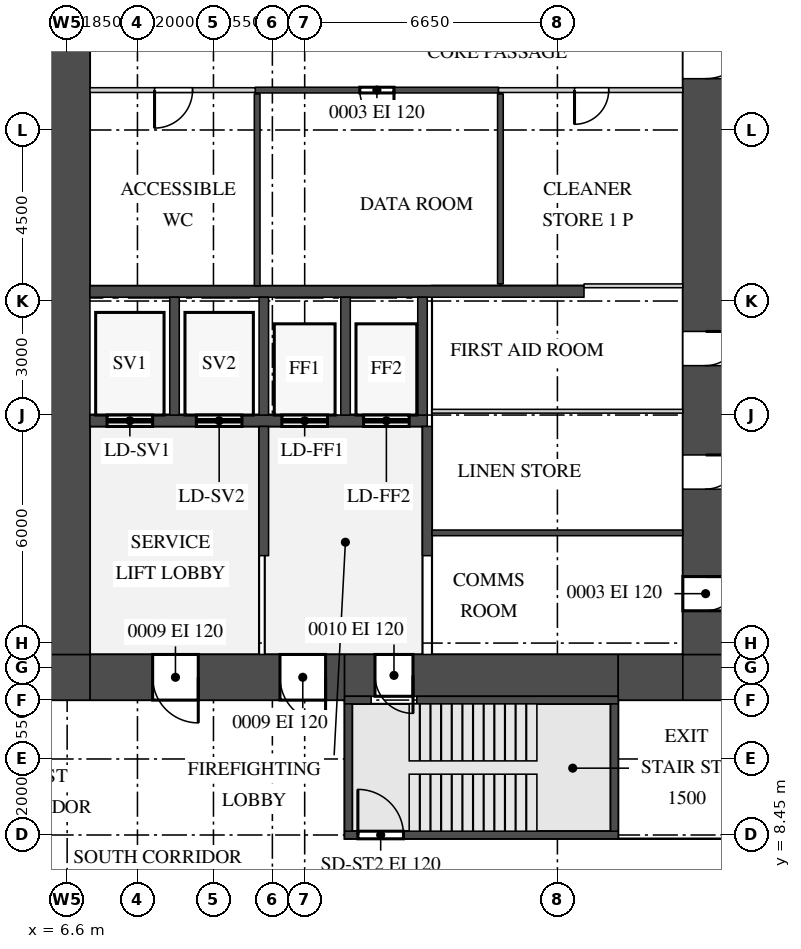
"""IFC4 building model, lengths in metres.
Left out: names, types, materials, properties, quantities, classifications, styles, units other than length and angle.
Written with IfcOpenShell. Run it as: python <this file> out.ifc"""

import sys

from ifc_helpers import new_model, si_unit, direction, frame, frame_2d, origin, place, context, subcontext, project, spatial, rectangle, extrude, source, transform, mapped, element, fill, save


model = new_model("IFC4")
c1 = context("Model", 3, precision=1e-05, world=origin(), true_north=direction((0.0, 1.0)))
c2 = subcontext(c1, "Body", "Model", "MODEL_VIEW")
j1 = project(units=[si_unit("LENGTHUNIT", "METRE"), si_unit("PLANEANGLEUNIT", "RADIAN")], contexts=[c1])
p1 = place(None, origin())
s1 = spatial("IfcSite", under=j1, at=p1, CompositionType="ELEMENT")
p2 = place(p1, origin())
s2 = spatial("IfcBuilding", under=s1, at=p2, CompositionType="ELEMENT")
p3 = place(p2, frame((0.0, 0.0, 46.5)))
s3 = spatial("IfcBuildingStorey", under=s2, at=p3, CompositionType="ELEMENT", Elevation=46.5)
m1 = source(origin(), c2, "Body", "SweptSolid", [
    extrude(rectangle(XDim=6.7, YDim=1.2, at=frame_2d((3.35, 0.0))), origin(), (0.0, 0.0, 1.0), 4.2),
])
p4 = place(p3, frame((7.2, 12.6, 0.0), z_axis=(0.0, 0.0, 1.0), x_axis=(1.0, 0.0, 0.0)))
e1 = element("IfcWall", 1, at=p4, inside=s3, PredefinedType="SHEAR", context=c2, shape_type="MappedRepresentation", body=[
    mapped(m1, transform((0.0, 0.0, 0.0))),
])
m2 = source(origin(), c2, "Body", "SweptSolid", [
    extrude(rectangle(XDim=1.2, YDim=2.1, at=frame_2d((0.6, 1.05))), frame((0.0, 0.61, 0.0), z_axis=(0.0, -1.0, 0.0), x_axis=(1.0, 0.0, 0.0)), (0.0, 0.0, 1.0), 1.22),
])
p5 = place(p4, frame((5.0, 0.0, 0.0)))
e2 = element("IfcOpeningElement", 2, at=p5, cuts=e1, PredefinedType="OPENING", context=c2, shape_type="MappedRepresentation", body=[
    mapped(m2, transform((0.0, 0.0, 0.0))),
])
p6 = place(p4, frame((1.65, 0.0, 0.0)))
e3 = element("IfcOpeningElement", 3, at=p6, cuts=e1, PredefinedType="OPENING", context=c2, shape_type="MappedRepresentation", body=[
    mapped(m2, transform((0.0, 0.0, 0.0))),
])
m3 = source(origin(), c2, "Body", "SweptSolid", [
    extrude(rectangle(XDim=7.2, YDim=1.1, at=frame_2d((3.6, 0.0))), origin(), (0.0, 0.0, 1.0), 4.2),
])
p7 = place(p3, frame((13.9, 12.65, 0.0), z_axis=(0.0, 0.0, 1.0), x_axis=(1.0, 0.0, 0.0)))
e4 = element("IfcWall", 4, at=p7, inside=s3, PredefinedType="SHEAR", context=c2, shape_type="MappedRepresentation", body=[
    mapped(m3, transform((0.0, 0.0, 0.0))),
])
m4 = source(origin(), c2, "Body", "SweptSolid", [
    extrude(rectangle(XDim=1.0, YDim=2.1, at=frame_2d((0.5, 1.05))), frame((0.0, 0.56, 0.0), z_axis=(0.0, -1.0, 0.0), x_axis=(1.0, 0.0, 0.0)), (0.0, 0.0, 1.0), 1.12),
])
p8 = place(p7, frame((0.8, 0.0, 0.0)))
e5 = element("IfcOpeningElement", 5, at=p8, cuts=e4, PredefinedType="OPENING", context=c2, shape_type="MappedRepresentation", body=[
    mapped(m4, transform((0.0, 0.0, 0.0))),
])
m5 = source(origin(), c2, "Body", "SweptSolid", [
    extrude(rectangle(XDim=1.7, YDim=1.2, at=frame_2d((0.85, 0.0))), origin(), (0.0, 0.0, 1.0), 4.2),
])
p9 = place(p3, frame((21.1, 12.6, 0.0), z_axis=(0.0, 0.0, 1.0), x_axis=(1.0, 0.0, 0.0)))
e6 = element("IfcWall", 6, at=p9, inside=s3, PredefinedType="SHEAR", context=c2, shape_type="MappedRepresentation", body=[
    mapped(m5, transform((0.0, 0.0, 0.0))),
])
m6 = source(origin(), c2, "Body", "SweptSolid", [
    extrude(rectangle(XDim=1.2, YDim=1.2, at=frame_2d((0.6, 0.0))), origin(), (0.0, 0.0, 1.0), 4.2),
])
for number, where, z_axis, x_axis in (
    (7, (22.8, 12.6, 0.0), (0.0, 0.0, 1.0), (1.0, 0.0, 0.0)),
    (8, (6.0, 12.6, 0.0), (0.0, 0.0, 1.0), (1.0, 0.0, 0.0)),
):
    element("IfcWall", number, at=place(p3, frame(where, z_axis=z_axis, x_axis=x_axis)), inside=s3, PredefinedType="SHEAR", context=c2, shape_type="MappedRepresentation", body=[
        mapped(m6, transform((0.0, 0.0, 0.0))),
    ])
m7 = source(origin(), c2, "Body", "SweptSolid", [
    extrude(rectangle(XDim=27.6, YDim=1.2, at=frame_2d((13.8, 0.0))), origin(), (0.0, 0.0, 1.0), 4.2),
])
p10 = place(p3, frame((23.4, 13.2, 0.0), z_axis=(0.0, 0.0, 1.0), x_axis=(0.0, 1.0, 0.0)))
e9 = element("IfcWall", 9, at=p10, inside=s3, PredefinedType="SHEAR", context=c2, shape_type="MappedRepresentation", body=[
    mapped(m7, transform((0.0, 0.0, 0.0))),
])
m8 = source(origin(), c2, "Body", "SweptSolid", [
    extrude(rectangle(XDim=1.8, YDim=2.1, at=frame_2d((0.9, 1.05))), frame((0.0, 0.61, 0.0), z_axis=(0.0, -1.0, 0.0), x_axis=(1.0, 0.0, 0.0)), (0.0, 0.0, 1.0), 1.22),
])
p11 = place(p10, frame((22.4, 0.0, 0.0)))
e10 = element("IfcOpeningElement", 10, at=p11, cuts=e9, PredefinedType="OPENING", context=c2, shape_type="MappedRepresentation", body=[
    mapped(m8, transform((0.0, 0.0, 0.0))),
])
p12 = place(p10, frame((15.15, 0.0, 0.0)))
e11 = element("IfcOpeningElement", 11, at=p12, cuts=e9, PredefinedType="OPENING", context=c2, shape_type="MappedRepresentation", body=[
    mapped(m2, transform((0.0, 0.0, 0.0))),
])
m9 = source(origin(), c2, "Body", "SweptSolid", [
    extrude(rectangle(XDim=0.9, YDim=2.1, at=frame_2d((0.45, 1.05))), frame((0.0, 0.61, 0.0), z_axis=(0.0, -1.0, 0.0), x_axis=(1.0, 0.0, 0.0)), (0.0, 0.0, 1.0), 1.22),
])
p13 = place(p10, frame((1.15, 0.0, 0.0)))
e12 = element("IfcOpeningElement", 12, at=p13, cuts=e9, PredefinedType="OPENING", context=c2, shape_type="MappedRepresentation", body=[
    mapped(m9, transform((0.0, 0.0, 0.0))),
])
p14 = place(p10, frame((4.35, 0.0, 0.0)))
e13 = element("IfcOpeningElement", 13, at=p14, cuts=e9, PredefinedType="OPENING", context=c2, shape_type="MappedRepresentation", body=[
    mapped(m9, transform((0.0, 0.0, 0.0))),
])
p15 = place(p10, frame((7.6, 0.0, 0.0)))
e14 = element("IfcOpeningElement", 14, at=p15, cuts=e9, PredefinedType="OPENING", context=c2, shape_type="MappedRepresentation", body=[
    mapped(m9, transform((0.0, 0.0, 0.0))),
])
p16 = place(p3, frame((6.6, 13.2, 0.0), z_axis=(0.0, 0.0, 1.0), x_axis=(0.0, 1.0, 0.0)))
e15 = element("IfcWall", 15, at=p16, inside=s3, PredefinedType="SHEAR", context=c2, shape_type="MappedRepresentation", body=[
    mapped(m7, transform((0.0, 0.0, 0.0))),
])
m10 = source(origin(), c2, "Body", "SweptSolid", [
    extrude(rectangle(XDim=0.7, YDim=0.2, at=frame_2d((0.35, 0.0))), origin(), (0.0, 0.0, 1.0), 4.2),
])
p17 = place(p3, frame((13.9, 12.0, 0.0), z_axis=(0.0, 0.0, 1.0), x_axis=(1.0, 0.0, 0.0)))
e16 = element("IfcWall", 16, at=p17, inside=s3, PredefinedType="SHEAR", context=c2, shape_type="MappedRepresentation", body=[
    mapped(m10, transform((0.0, 0.0, 0.0))),
])
m11 = source(origin(), c2, "Body", "SweptSolid", [
    extrude(rectangle(XDim=5.3, YDim=0.2, at=frame_2d((2.65, 0.0))), origin(), (0.0, 0.0, 1.0), 4.2),
])
p18 = place(p3, frame((15.8, 12.0, 0.0), z_axis=(0.0, 0.0, 1.0), x_axis=(1.0, 0.0, 0.0)))
e17 = element("IfcWall", 17, at=p18, inside=s3, PredefinedType="SHEAR", context=c2, shape_type="MappedRepresentation", body=[
    mapped(m11, transform((0.0, 0.0, 0.0))),
])
m12 = source(origin(), c2, "Body", "SweptSolid", [
    extrude(rectangle(XDim=7.2, YDim=0.2, at=frame_2d((3.6, 0.0))), origin(), (0.0, 0.0, 1.0), 4.2),
])
p19 = place(p3, frame((13.9, 8.45, 0.0), z_axis=(0.0, 0.0, 1.0), x_axis=(1.0, 0.0, 0.0)))
e18 = element("IfcWall", 18, at=p19, inside=s3, PredefinedType="SHEAR", context=c2, shape_type="MappedRepresentation", body=[
    mapped(m12, transform((0.0, 0.0, 0.0))),
])
m13 = source(origin(), c2, "Body", "SweptSolid", [
    extrude(rectangle(XDim=1.2, YDim=2.1, at=frame_2d((0.6, 1.05))), frame((0.0, 0.11, 0.0), z_axis=(0.0, -1.0, 0.0), x_axis=(1.0, 0.0, 0.0)), (0.0, 0.0, 1.0), 0.22),
])
p20 = place(p19, frame((0.35, 0.0, 0.0)))
e19 = element("IfcOpeningElement", 19, at=p20, cuts=e18, PredefinedType="OPENING", context=c2, shape_type="MappedRepresentation", body=[
    mapped(m13, transform((0.0, 0.0, 0.0))),
])
m14 = source(origin(), c2, "Body", "SweptSolid", [
    extrude(rectangle(XDim=3.35, YDim=0.2, at=frame_2d((1.675, 0.0))), origin(), (0.0, 0.0, 1.0), 4.2),
])
for number, where, z_axis, x_axis in (
    (20, (21.0, 8.55, 0.0), (0.0, 0.0, 1.0), (0.0, 1.0, 0.0)),
    (21, (14.0, 8.55, 0.0), (0.0, 0.0, 1.0), (0.0, 1.0, 0.0)),
):
    element("IfcWall", number, at=place(p3, frame(where, z_axis=z_axis, x_axis=x_axis)), inside=s3, PredefinedType="SHEAR", context=c2, shape_type="MappedRepresentation", body=[
        mapped(m14, transform((0.0, 0.0, 0.0))),
    ])
m15 = source(origin(), c2, "Body", "SweptSolid", [
    extrude(rectangle(XDim=13.0, YDim=0.3, at=frame_2d((6.5, 0.0))), origin(), (0.0, 0.0, 1.0), 4.2),
])
p21 = place(p3, frame((7.2, 22.75, 0.0), z_axis=(0.0, 0.0, 1.0), x_axis=(1.0, 0.0, 0.0)))
e22 = element("IfcWall", 22, at=p21, inside=s3, PredefinedType="STANDARD", context=c2, shape_type="MappedRepresentation", body=[
    mapped(m15, transform((0.0, 0.0, 0.0))),
])
m16 = source(origin(), c2, "Body", "SweptSolid", [
    extrude(rectangle(XDim=8.875, YDim=0.3, at=frame_2d((4.438, 0.0))), origin(), (0.0, 0.0, 1.0), 4.2),
])
p22 = place(p3, frame((7.2, 19.35, 0.0), z_axis=(0.0, 0.0, 1.0), x_axis=(1.0, 0.0, 0.0)))
e23 = element("IfcWall", 23, at=p22, inside=s3, PredefinedType="STANDARD", context=c2, shape_type="MappedRepresentation", body=[
    mapped(m16, transform((0.0, 0.0, 0.0))),
])
m17 = source(origin(), c2, "Body", "SweptSolid", [
    extrude(rectangle(XDim=1.2, YDim=2.1, at=frame_2d((0.6, 1.05))), frame((0.0, 0.16, 0.0), z_axis=(0.0, -1.0, 0.0), x_axis=(1.0, 0.0, 0.0)), (0.0, 0.0, 1.0), 0.32),
])
p23 = place(p22, frame((0.45, 0.0, 0.0)))
e24 = element("IfcOpeningElement", 24, at=p23, cuts=e23, PredefinedType="OPENING", context=c2, shape_type="MappedRepresentation", body=[
    mapped(m17, transform((0.0, 0.0, 0.0))),
])
p24 = place(p22, frame((2.8, 0.0, 0.0)))
e25 = element("IfcOpeningElement", 25, at=p24, cuts=e23, PredefinedType="OPENING", context=c2, shape_type="MappedRepresentation", body=[
    mapped(m17, transform((0.0, 0.0, 0.0))),
])
p25 = place(p22, frame((5.05, 0.0, 0.0)))
e26 = element("IfcOpeningElement", 26, at=p25, cuts=e23, PredefinedType="OPENING", context=c2, shape_type="MappedRepresentation", body=[
    mapped(m17, transform((0.0, 0.0, 0.0))),
])
p26 = place(p22, frame((7.2, 0.0, 0.0)))
e27 = element("IfcOpeningElement", 27, at=p26, cuts=e23, PredefinedType="OPENING", context=c2, shape_type="MappedRepresentation", body=[
    mapped(m17, transform((0.0, 0.0, 0.0))),
])
m18 = source(origin(), c2, "Body", "SweptSolid", [
    extrude(rectangle(XDim=3.1, YDim=0.25, at=frame_2d((1.55, 0.0))), origin(), (0.0, 0.0, 1.0), 4.2),
])
for number, where, z_axis, x_axis in (
    (28, (9.425, 19.5, 0.0), (0.0, 0.0, 1.0), (0.0, 1.0, 0.0)),
    (29, (11.775, 19.5, 0.0), (0.0, 0.0, 1.0), (0.0, 1.0, 0.0)),
    (30, (13.925, 19.5, 0.0), (0.0, 0.0, 1.0), (0.0, 1.0, 0.0)),
    (31, (15.95, 19.5, 0.0), (0.0, 0.0, 1.0), (0.0, 1.0, 0.0)),
):
    element("IfcWall", number, at=place(p3, frame(where, z_axis=z_axis, x_axis=x_axis)), inside=s3, PredefinedType="STANDARD", context=c2, shape_type="MappedRepresentation", body=[
        mapped(m18, transform((0.0, 0.0, 0.0))),
    ])
m19 = source(origin(), c2, "Body", "SweptSolid", [
    extrude(rectangle(XDim=3.4, YDim=0.25, at=frame_2d((1.7, 0.0))), origin(), (0.0, 0.0, 1.0), 4.2),
])
for number, where, z_axis, x_axis in (
    (32, (16.075, 15.8, 0.0), (0.0, 0.0, 1.0), (0.0, 1.0, 0.0)),
    (33, (11.775, 15.8, 0.0), (0.0, 0.0, 1.0), (0.0, 1.0, 0.0)),
):
    element("IfcWall", number, at=place(p3, frame(where, z_axis=z_axis, x_axis=x_axis)), inside=s3, PredefinedType="STANDARD", context=c2, shape_type="MappedRepresentation", body=[
        mapped(m19, transform((0.0, 0.0, 0.0))),
    ])
m20 = source(origin(), c2, "Body", "SweptSolid", [
    extrude(rectangle(XDim=6.6, YDim=0.15, at=frame_2d((3.3, 0.0))), origin(), (0.0, 0.0, 1.0), 4.3),
])
p27 = place(p3, frame((16.2, 16.4, 0.0), z_axis=(0.0, 0.0, 1.0), x_axis=(1.0, 0.0, 0.0)))
e34 = element("IfcWall", 34, at=p27, inside=s3, PredefinedType="PARTITIONING", context=c2, shape_type="MappedRepresentation", body=[
    mapped(m20, transform((0.0, 0.0, 0.0))),
])
m21 = source(origin(), c2, "Body", "SweptSolid", [
    extrude(rectangle(XDim=6.6, YDim=0.1, at=frame_2d((3.3, 0.0))), origin(), (0.0, 0.0, 1.0), 4.3),
])
p28 = place(p3, frame((16.2, 19.6, 0.0), z_axis=(0.0, 0.0, 1.0), x_axis=(1.0, 0.0, 0.0)))
e35 = element("IfcWall", 35, at=p28, inside=s3, PredefinedType="PARTITIONING", context=c2, shape_type="MappedRepresentation", body=[
    mapped(m21, transform((0.0, 0.0, 0.0))),
])
m22 = source(origin(), c2, "Body", "SweptSolid", [
    extrude(rectangle(XDim=5.05, YDim=0.15, at=frame_2d((2.525, 0.0))), origin(), (0.0, 0.0, 1.0), 4.3),
])
p29 = place(p3, frame((11.6, 22.9, 0.0), z_axis=(0.0, 0.0, 1.0), x_axis=(0.0, 1.0, 0.0)))
e36 = element("IfcWall", 36, at=p29, inside=s3, PredefinedType="PARTITIONING", context=c2, shape_type="MappedRepresentation", body=[
    mapped(m22, transform((0.0, 0.0, 0.0))),
])
m23 = source(origin(), c2, "Body", "SweptSolid", [
    extrude(rectangle(XDim=2.6, YDim=0.1, at=frame_2d((1.3, 0.0))), origin(), (0.0, 0.0, 1.0), 4.3),
])
p30 = place(p3, frame((20.2, 22.9, 0.0), z_axis=(0.0, 0.0, 1.0), x_axis=(1.0, 0.0, 0.0)))
e37 = element("IfcWall", 37, at=p30, inside=s3, PredefinedType="PARTITIONING", context=c2, shape_type="MappedRepresentation", body=[
    mapped(m23, transform((0.0, 0.0, 0.0))),
])
m24 = source(origin(), c2, "Body", "SweptSolid", [
    extrude(rectangle(XDim=5.0, YDim=0.15, at=frame_2d((2.5, 0.0))), origin(), (0.0, 0.0, 1.0), 4.3),
])
p31 = place(p3, frame((18.0, 22.95, 0.0), z_axis=(0.0, 0.0, 1.0), x_axis=(0.0, 1.0, 0.0)))
e38 = element("IfcWall", 38, at=p31, inside=s3, PredefinedType="PARTITIONING", context=c2, shape_type="MappedRepresentation", body=[
    mapped(m24, transform((0.0, 0.0, 0.0))),
])
m25 = source(origin(), c2, "Body", "SweptSolid", [
    extrude(rectangle(XDim=4.35, YDim=0.125, at=frame_2d((2.175, 0.0))), origin(), (0.0, 0.0, 1.0), 4.3),
])
p32 = place(p3, frame((7.2, 28.05, 0.0), z_axis=(0.0, 0.0, 1.0), x_axis=(1.0, 0.0, 0.0)))
e39 = element("IfcWall", 39, at=p32, inside=s3, PredefinedType="PARTITIONING", context=c2, shape_type="MappedRepresentation", body=[
    mapped(m25, transform((0.0, 0.0, 0.0))),
])
m26 = source(origin(), c2, "Body", "SweptSolid", [
    extrude(rectangle(XDim=1.0, YDim=2.1, at=frame_2d((0.5, 1.05))), frame((0.0, 0.073, 0.0), z_axis=(0.0, -1.0, 0.0), x_axis=(1.0, 0.0, 0.0)), (0.0, 0.0, 1.0), 0.145),
])
p33 = place(p32, frame((1.7, 0.0, 0.0)))
e40 = element("IfcOpeningElement", 40, at=p33, cuts=e39, PredefinedType="OPENING", context=c2, shape_type="MappedRepresentation", body=[
    mapped(m26, transform((0.0, 0.0, 0.0))),
])
m27 = source(origin(), c2, "Body", "SweptSolid", [
    extrude(rectangle(XDim=6.4, YDim=0.15, at=frame_2d((3.2, 0.0))), origin(), (0.0, 0.0, 1.0), 4.3),
])
p34 = place(p3, frame((11.55, 28.05, 0.0), z_axis=(0.0, 0.0, 1.0), x_axis=(1.0, 0.0, 0.0)))
e41 = element("IfcWall", 41, at=p34, inside=s3, PredefinedType="PARTITIONING", context=c2, shape_type="MappedRepresentation", body=[
    mapped(m27, transform((0.0, 0.0, 0.0))),
])
m28 = source(origin(), c2, "Body", "SweptSolid", [
    extrude(rectangle(XDim=0.9, YDim=2.1, at=frame_2d((0.45, 1.05))), frame((0.0, 0.085, 0.0), z_axis=(0.0, -1.0, 0.0), x_axis=(1.0, 0.0, 0.0)), (0.0, 0.0, 1.0), 0.17),
])
p35 = place(p34, frame((2.75, 0.0, 0.0)))
e42 = element("IfcOpeningElement", 42, at=p35, cuts=e41, PredefinedType="OPENING", context=c2, shape_type="MappedRepresentation", body=[
    mapped(m28, transform((0.0, 0.0, 0.0))),
])
m29 = source(origin(), c2, "Body", "SweptSolid", [
    extrude(rectangle(XDim=4.85, YDim=0.125, at=frame_2d((2.425, 0.0))), origin(), (0.0, 0.0, 1.0), 4.3),
])
p36 = place(p3, frame((17.95, 28.05, 0.0), z_axis=(0.0, 0.0, 1.0), x_axis=(1.0, 0.0, 0.0)))
e43 = element("IfcWall", 43, at=p36, inside=s3, PredefinedType="PARTITIONING", context=c2, shape_type="MappedRepresentation", body=[
    mapped(m29, transform((0.0, 0.0, 0.0))),
])
m30 = source(origin(), c2, "Body", "SweptSolid", [
    extrude(rectangle(XDim=0.9, YDim=2.1, at=frame_2d((0.45, 1.05))), frame((0.0, 0.073, 0.0), z_axis=(0.0, -1.0, 0.0), x_axis=(1.0, 0.0, 0.0)), (0.0, 0.0, 1.0), 0.145),
])
p37 = place(p36, frame((2.0, 0.0, 0.0)))
e44 = element("IfcOpeningElement", 44, at=p37, cuts=e43, PredefinedType="OPENING", context=c2, shape_type="MappedRepresentation", body=[
    mapped(m30, transform((0.0, 0.0, 0.0))),
])
m31 = source(origin(), c2, "Body", "SweptSolid", [
    extrude(rectangle(XDim=1.2, YDim=2.1, at=frame_2d((0.6, 1.05))), frame((0.0, 0.55, 0.0), z_axis=(0.0, -1.0, 0.0), x_axis=(1.0, 0.0, 0.0)), (0.0, 0.0, 1.0), 1.1),
])
p38 = place(p12, origin())
e45 = element("IfcDoor", 45, at=p38, inside=s3, OperationType="SINGLE_SWING_RIGHT", PredefinedType="DOOR", context=c2, shape_type="MappedRepresentation", body=[
    mapped(m31, transform((0.0, 0.0, 0.0))),
])
fill(e11, e45)
m32 = source(origin(), c2, "Body", "SweptSolid", [
    extrude(rectangle(XDim=1.0, YDim=2.1, at=frame_2d((0.5, 1.05))), frame((0.0, 0.025, 0.0), z_axis=(0.0, -1.0, 0.0), x_axis=(1.0, 0.0, 0.0)), (0.0, 0.0, 1.0), 0.05),
])
p39 = place(p33, origin())
e46 = element("IfcDoor", 46, at=p39, inside=s3, OperationType="SINGLE_SWING_LEFT", PredefinedType="DOOR", context=c2, shape_type="MappedRepresentation", body=[
    mapped(m32, transform((0.0, 0.0, 0.0))),
])
fill(e40, e46)
m33 = source(origin(), c2, "Body", "SweptSolid", [
    extrude(rectangle(XDim=0.9, YDim=2.1, at=frame_2d((0.45, 1.05))), frame((0.0, 0.025, 0.0), z_axis=(0.0, -1.0, 0.0), x_axis=(1.0, 0.0, 0.0)), (0.0, 0.0, 1.0), 0.05),
])
p40 = place(p35, origin())
e47 = element("IfcDoor", 47, at=p40, inside=s3, OperationType="SINGLE_SWING_RIGHT", PredefinedType="DOOR", context=c2, shape_type="MappedRepresentation", body=[
    mapped(m33, transform((0.0, 0.0, 0.0))),
])
fill(e42, e47)
p41 = place(p37, origin())
e48 = element("IfcDoor", 48, at=p41, inside=s3, OperationType="SINGLE_SWING_LEFT", PredefinedType="DOOR", context=c2, shape_type="MappedRepresentation", body=[
    mapped(m33, transform((0.0, 0.0, 0.0))),
])
fill(e44, e48)
m34 = source(origin(), c2, "Body", "SweptSolid", [
    extrude(rectangle(XDim=0.9, YDim=2.1, at=frame_2d((0.45, 1.05))), frame((0.0, 0.55, 0.0), z_axis=(0.0, -1.0, 0.0), x_axis=(1.0, 0.0, 0.0)), (0.0, 0.0, 1.0), 1.1),
])
p42 = place(p13, origin())
e49 = element("IfcDoor", 49, at=p42, inside=s3, OperationType="SINGLE_SWING_RIGHT", PredefinedType="DOOR", context=c2, shape_type="MappedRepresentation", body=[
    mapped(m34, transform((0.0, 0.0, 0.0))),
])
fill(e12, e49)
p43 = place(p14, origin())
e50 = element("IfcDoor", 50, at=p43, inside=s3, OperationType="SINGLE_SWING_RIGHT", PredefinedType="DOOR", context=c2, shape_type="MappedRepresentation", body=[
    mapped(m34, transform((0.0, 0.0, 0.0))),
])
fill(e13, e50)
p44 = place(p15, origin())
e51 = element("IfcDoor", 51, at=p44, inside=s3, OperationType="SINGLE_SWING_RIGHT", PredefinedType="DOOR", context=c2, shape_type="MappedRepresentation", body=[
    mapped(m34, transform((0.0, 0.0, 0.0))),
])
fill(e14, e51)
p45 = place(p5, origin())
e52 = element("IfcDoor", 52, at=p45, inside=s3, OperationType="SINGLE_SWING_RIGHT", PredefinedType="DOOR", context=c2, shape_type="MappedRepresentation", body=[
    mapped(m31, transform((0.0, 0.0, 0.0))),
])
fill(e2, e52)
p46 = place(p6, origin())
e53 = element("IfcDoor", 53, at=p46, inside=s3, OperationType="SINGLE_SWING_RIGHT", PredefinedType="DOOR", context=c2, shape_type="MappedRepresentation", body=[
    mapped(m31, transform((0.0, 0.0, 0.0))),
])
fill(e3, e53)
m35 = source(origin(), c2, "Body", "SweptSolid", [
    extrude(rectangle(XDim=1.0, YDim=2.1, at=frame_2d((0.5, 1.05))), frame((0.0, 0.5, 0.0), z_axis=(0.0, -1.0, 0.0), x_axis=(1.0, 0.0, 0.0)), (0.0, 0.0, 1.0), 1.0),
])
p47 = place(p8, origin())
e54 = element("IfcDoor", 54, at=p47, inside=s3, OperationType="SINGLE_SWING_RIGHT", PredefinedType="DOOR", context=c2, shape_type="MappedRepresentation", body=[
    mapped(m35, transform((0.0, 0.0, 0.0))),
])
fill(e5, e54)
m36 = source(origin(), c2, "Body", "SweptSolid", [
    extrude(rectangle(XDim=1.2, YDim=2.1, at=frame_2d((0.6, 1.05))), frame((0.0, 0.025, 0.0), z_axis=(0.0, -1.0, 0.0), x_axis=(1.0, 0.0, 0.0)), (0.0, 0.0, 1.0), 0.05),
])
p48 = place(p20, origin())
e55 = element("IfcDoor", 55, at=p48, inside=s3, OperationType="SINGLE_SWING_RIGHT", PredefinedType="DOOR", context=c2, shape_type="MappedRepresentation", body=[
    mapped(m36, transform((0.0, 0.0, 0.0))),
])
fill(e19, e55)
p49 = place(p23, origin())
e56 = element("IfcDoor", 56, at=p49, inside=s3, OperationType="DOUBLE_DOOR_SLIDING", PredefinedType="DOOR", context=c2, shape_type="MappedRepresentation", body=[
    mapped(m36, transform((0.0, 0.0, 0.0))),
])
fill(e24, e56)
p50 = place(p24, origin())
e57 = element("IfcDoor", 57, at=p50, inside=s3, OperationType="DOUBLE_DOOR_SLIDING", PredefinedType="DOOR", context=c2, shape_type="MappedRepresentation", body=[
    mapped(m36, transform((0.0, 0.0, 0.0))),
])
fill(e25, e57)
p51 = place(p25, origin())
e58 = element("IfcDoor", 58, at=p51, inside=s3, OperationType="DOUBLE_DOOR_SLIDING", PredefinedType="DOOR", context=c2, shape_type="MappedRepresentation", body=[
    mapped(m36, transform((0.0, 0.0, 0.0))),
])
fill(e26, e58)
p52 = place(p26, origin())
e59 = element("IfcDoor", 59, at=p52, inside=s3, OperationType="DOUBLE_DOOR_SLIDING", PredefinedType="DOOR", context=c2, shape_type="MappedRepresentation", body=[
    mapped(m36, transform((0.0, 0.0, 0.0))),
])
fill(e27, e59)
save(model, sys.argv[1])
